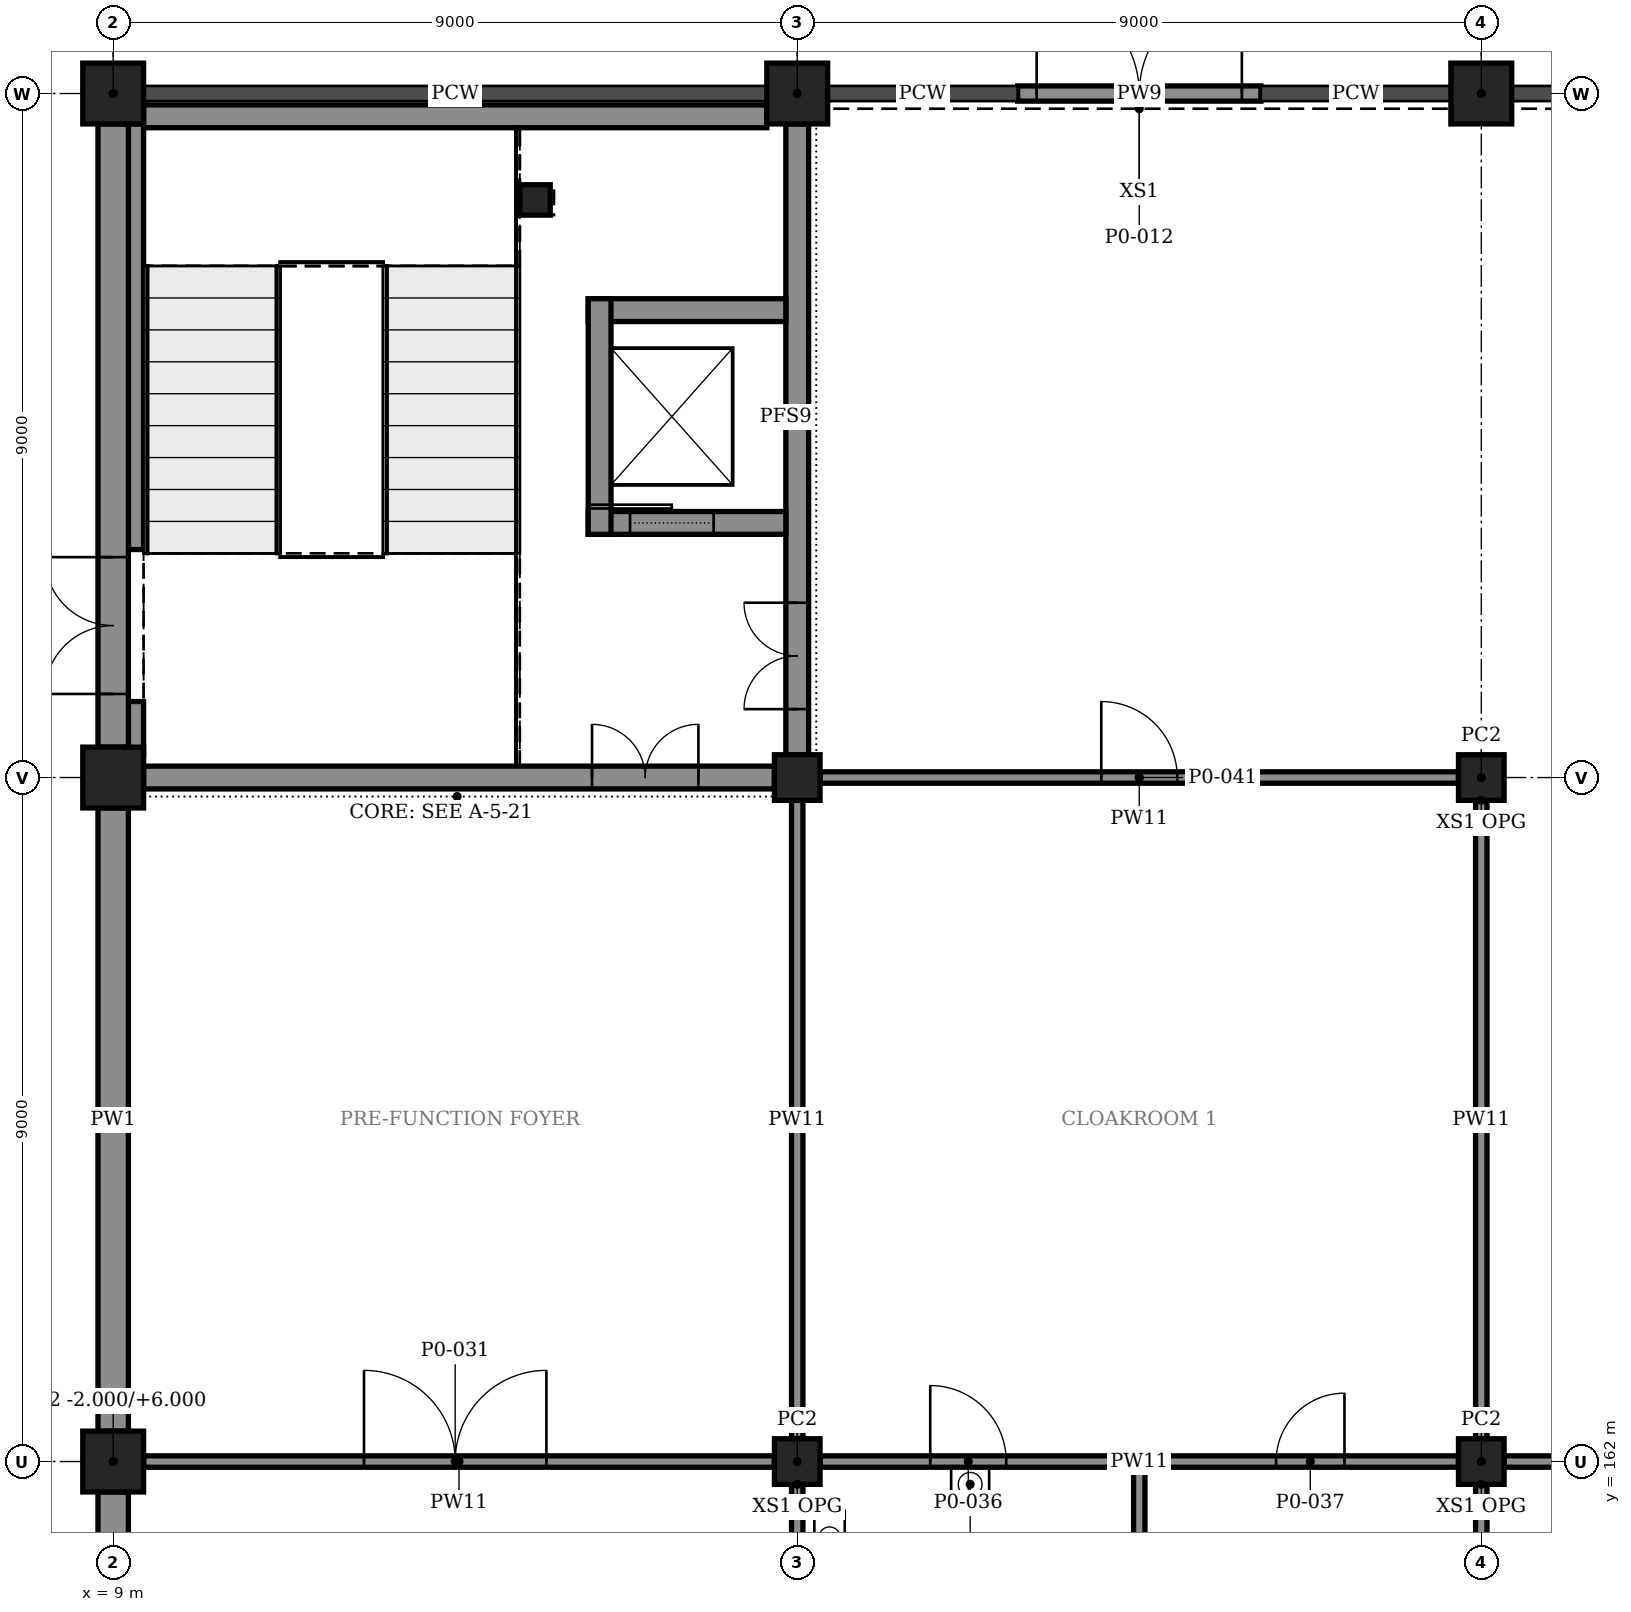
"""IFC4 building model, lengths in metres.
Left out: names, types, materials, properties, quantities, classifications, styles, units other than length and angle.
Written with IfcOpenShell. Run it as: python <this file> out.ifc"""

import sys

from ifc_helpers import new_model, si_unit, direction, frame, frame_2d, origin, origin_2d, place, context, subcontext, project, spatial, rectangle, extrude, element, fill, save


model = new_model("IFC4")
c1 = context("Model", 3, precision=1e-05, world=origin(), true_north=direction((0.0, 1.0)))
c2 = subcontext(c1, "Body", "Model", "MODEL_VIEW")
j1 = project(units=[si_unit("LENGTHUNIT", "METRE"), si_unit("PLANEANGLEUNIT", "RADIAN")], contexts=[c1])
p1 = place(None, origin())
s1 = spatial("IfcSite", under=j1, at=p1, CompositionType="ELEMENT")
p2 = place(p1, origin())
s2 = spatial("IfcBuilding", under=s1, at=p2, CompositionType="ELEMENT")
p3 = place(p2, origin())
s3 = spatial("IfcBuildingStorey", under=s2, at=p3, CompositionType="ELEMENT", Elevation=0.0)
p4 = place(p3, frame((9.0, 162.0, -2.0), z_axis=(0.0, 0.0, 1.0), x_axis=(1.0, 0.0, 0.0)))
e1 = element("IfcColumn", 1, at=p4, inside=s3, PredefinedType="COLUMN", context=c2, shape_type="SweptSolid", body=[
    extrude(rectangle(XDim=0.8, YDim=0.8, at=origin_2d()), origin(), (0.0, 0.0, 1.0), 8.0),
])
for number, where, z_axis, x_axis in (
    (2, (18.0, 162.0, -2.0), (0.0, 0.0, 1.0), (1.0, 0.0, 0.0)),
    (3, (27.0, 162.0, -2.0), (0.0, 0.0, 1.0), (1.0, 0.0, 0.0)),
):
    element("IfcColumn", number, at=place(p3, frame(where, z_axis=z_axis, x_axis=x_axis)), inside=s3, PredefinedType="COLUMN", context=c2, shape_type="SweptSolid", body=[
        extrude(rectangle(XDim=0.6, YDim=0.6, at=origin_2d()), origin(), (0.0, 0.0, 1.0), 8.0),
    ])
p5 = place(p3, frame((9.0, 171.0, -2.0), z_axis=(0.0, 0.0, 1.0), x_axis=(1.0, 0.0, 0.0)))
e4 = element("IfcColumn", 4, at=p5, inside=s3, PredefinedType="COLUMN", context=c2, shape_type="SweptSolid", body=[
    extrude(rectangle(XDim=0.8, YDim=0.8, at=origin_2d()), origin(), (0.0, 0.0, 1.0), 8.0),
])
for number, where, z_axis, x_axis in (
    (5, (18.0, 171.0, -2.0), (0.0, 0.0, 1.0), (1.0, 0.0, 0.0)),
    (6, (27.0, 171.0, -2.0), (0.0, 0.0, 1.0), (1.0, 0.0, 0.0)),
):
    element("IfcColumn", number, at=place(p3, frame(where, z_axis=z_axis, x_axis=x_axis)), inside=s3, PredefinedType="COLUMN", context=c2, shape_type="SweptSolid", body=[
        extrude(rectangle(XDim=0.6, YDim=0.6, at=origin_2d()), origin(), (0.0, 0.0, 1.0), 8.0),
    ])
for number, where, z_axis, x_axis in (
    (7, (9.0, 180.0, -2.0), (0.0, 0.0, 1.0), (1.0, 0.0, 0.0)),
    (8, (18.0, 180.0, -2.0), (0.0, 0.0, 1.0), (1.0, 0.0, 0.0)),
    (9, (27.0, 180.0, -2.0), (0.0, 0.0, 1.0), (1.0, 0.0, 0.0)),
):
    element("IfcColumn", number, at=place(p3, frame(where, z_axis=z_axis, x_axis=x_axis)), inside=s3, PredefinedType="COLUMN", context=c2, shape_type="SweptSolid", body=[
        extrude(rectangle(XDim=0.8, YDim=0.8, at=origin_2d()), origin(), (0.0, 0.0, 1.0), 8.0),
    ])
p6 = place(p3, frame((14.55, 178.6, -0.3), z_axis=(0.0, 0.0, 1.0), x_axis=(1.0, 0.0, 0.0)))
e10 = element("IfcColumn", 10, at=p6, inside=s3, PredefinedType="COLUMN", context=c2, shape_type="SweptSolid", body=[
    extrude(rectangle(XDim=0.4, YDim=0.4, at=origin_2d()), origin(), (0.0, 0.0, 1.0), 6.3),
])
p7 = place(p3, frame((9.0, 153.4, 0.0), z_axis=(0.0, 0.0, 1.0), x_axis=(0.0, 1.0, 0.0)))
e11 = element("IfcWall", 11, at=p7, inside=s3, PredefinedType="SOLIDWALL", context=c2, shape_type="SweptSolid", body=[
    extrude(rectangle(XDim=8.2, YDim=0.4, at=frame_2d((4.1, 0.0))), origin(), (0.0, 0.0, 1.0), 6.0),
])
p8 = place(p7, frame((2.9, 0.0, 0.0)))
e12 = element("IfcOpeningElement", 12, at=p8, cuts=e11, PredefinedType="OPENING", context=c2, shape_type="SweptSolid", body=[
    extrude(rectangle(XDim=2.4, YDim=2.4, at=frame_2d((1.2, 1.2))), frame((0.0, 0.21, 0.0), z_axis=(0.0, -1.0, 0.0), x_axis=(1.0, 0.0, 0.0)), (0.0, 0.0, 1.0), 0.42),
])
p9 = place(p3, frame((9.0, 162.4, 0.0), z_axis=(0.0, 0.0, 1.0), x_axis=(0.0, 1.0, 0.0)))
e13 = element("IfcWall", 13, at=p9, inside=s3, PredefinedType="SOLIDWALL", context=c2, shape_type="SweptSolid", body=[
    extrude(rectangle(XDim=8.2, YDim=0.4, at=frame_2d((4.1, 0.0))), origin(), (0.0, 0.0, 1.0), 6.0),
])
p10 = place(p3, frame((9.0, 171.4, 0.0), z_axis=(0.0, 0.0, 1.0), x_axis=(0.0, 1.0, 0.0)))
e14 = element("IfcWall", 14, at=p10, inside=s3, PredefinedType="SOLIDWALL", context=c2, shape_type="SweptSolid", body=[
    extrude(rectangle(XDim=8.2, YDim=0.4, at=frame_2d((4.1, 0.0))), origin(), (0.0, 0.0, 1.0), 6.0),
])
p11 = place(p10, frame((0.7, 0.0, 0.0)))
e15 = element("IfcOpeningElement", 15, at=p11, cuts=e14, PredefinedType="OPENING", context=c2, shape_type="SweptSolid", body=[
    extrude(rectangle(XDim=1.8, YDim=2.4, at=frame_2d((0.9, 1.2))), frame((0.0, 0.21, 0.0), z_axis=(0.0, -1.0, 0.0), x_axis=(1.0, 0.0, 0.0)), (0.0, 0.0, 1.0), 0.42),
])
p12 = place(p3, frame((20.9, 180.0, 0.0), z_axis=(0.0, 0.0, 1.0), x_axis=(1.0, 0.0, 0.0)))
e16 = element("IfcWall", 16, at=p12, inside=s3, PredefinedType="STANDARD", context=c2, shape_type="SweptSolid", body=[
    extrude(rectangle(XDim=3.2, YDim=0.2, at=frame_2d((1.6, 0.0))), origin(), (0.0, 0.0, 1.0), 4.82),
])
p13 = place(p12, frame((0.25, 0.0, 0.0)))
e17 = element("IfcOpeningElement", 17, at=p13, cuts=e16, PredefinedType="OPENING", context=c2, shape_type="SweptSolid", body=[
    extrude(rectangle(XDim=2.7, YDim=3.0, at=frame_2d((1.35, 1.5))), frame((0.0, 0.11, 0.0), z_axis=(0.0, -1.0, 0.0), x_axis=(1.0, 0.0, 0.0)), (0.0, 0.0, 1.0), 0.22),
])
p14 = place(p3, frame((18.0, 171.3, 0.0), z_axis=(0.0, 0.0, 1.0), x_axis=(0.0, 1.0, 0.0)))
e18 = element("IfcWall", 18, at=p14, inside=s3, PredefinedType="SOLIDWALL", context=c2, shape_type="SweptSolid", body=[
    extrude(rectangle(XDim=8.3, YDim=0.3, at=frame_2d((4.15, 0.0))), origin(), (0.0, 0.0, 1.0), 4.82),
])
p15 = place(p14, frame((0.6, 0.0, 0.0)))
e19 = element("IfcOpeningElement", 19, at=p15, cuts=e18, PredefinedType="OPENING", context=c2, shape_type="SweptSolid", body=[
    extrude(rectangle(XDim=1.4, YDim=2.4, at=frame_2d((0.7, 1.2))), frame((0.0, 0.16, 0.0), z_axis=(0.0, -1.0, 0.0), x_axis=(1.0, 0.0, 0.0)), (0.0, 0.0, 1.0), 0.32),
])
p16 = place(p3, frame((9.4, 171.0, 0.0), z_axis=(0.0, 0.0, 1.0), x_axis=(1.0, 0.0, 0.0)))
e20 = element("IfcWall", 20, at=p16, inside=s3, PredefinedType="SOLIDWALL", context=c2, shape_type="SweptSolid", body=[
    extrude(rectangle(XDim=8.3, YDim=0.3, at=frame_2d((4.15, 0.0))), origin(), (0.0, 0.0, 1.0), 4.82),
])
p17 = place(p16, frame((5.9, 0.0, 0.0)))
e21 = element("IfcOpeningElement", 21, at=p17, cuts=e20, PredefinedType="OPENING", context=c2, shape_type="SweptSolid", body=[
    extrude(rectangle(XDim=1.4, YDim=2.4, at=frame_2d((0.7, 1.2))), frame((0.0, 0.16, 0.0), z_axis=(0.0, -1.0, 0.0), x_axis=(1.0, 0.0, 0.0)), (0.0, 0.0, 1.0), 0.32),
])
p18 = place(p3, frame((9.3, 171.3, 0.0), z_axis=(0.0, 0.0, 1.0), x_axis=(0.0, 1.0, 0.0)))
e22 = element("IfcWall", 22, at=p18, inside=s3, PredefinedType="SOLIDWALL", context=c2, shape_type="SweptSolid", body=[
    extrude(rectangle(XDim=0.7, YDim=0.2, at=frame_2d((0.35, 0.0))), origin(), (0.0, 0.0, 1.0), 5.72),
])
p19 = place(p3, frame((9.3, 174.0, 0.0), z_axis=(0.0, 0.0, 1.0), x_axis=(0.0, 1.0, 0.0)))
e23 = element("IfcWall", 23, at=p19, inside=s3, PredefinedType="SOLIDWALL", context=c2, shape_type="SweptSolid", body=[
    extrude(rectangle(XDim=5.6, YDim=0.2, at=frame_2d((2.8, 0.0))), origin(), (0.0, 0.0, 1.0), 5.72),
])
p20 = place(p3, frame((9.4, 179.7, 0.0), z_axis=(0.0, 0.0, 1.0), x_axis=(1.0, 0.0, 0.0)))
e24 = element("IfcWall", 24, at=p20, inside=s3, PredefinedType="SOLIDWALL", context=c2, shape_type="SweptSolid", body=[
    extrude(rectangle(XDim=8.2, YDim=0.3, at=frame_2d((4.1, 0.0))), origin(), (0.0, 0.0, 1.0), 4.82),
])
p21 = place(p3, frame((9.4, 162.0, 0.0), z_axis=(0.0, 0.0, 1.0), x_axis=(1.0, 0.0, 0.0)))
e25 = element("IfcWall", 25, at=p21, inside=s3, PredefinedType="PARTITIONING", context=c2, shape_type="SweptSolid", body=[
    extrude(rectangle(XDim=8.3, YDim=0.15, at=frame_2d((4.15, 0.0))), origin(), (0.0, 0.0, 1.0), 4.82),
])
p22 = place(p21, frame((2.9, 0.0, 0.0)))
e26 = element("IfcOpeningElement", 26, at=p22, cuts=e25, PredefinedType="OPENING", context=c2, shape_type="SweptSolid", body=[
    extrude(rectangle(XDim=2.4, YDim=2.4, at=frame_2d((1.2, 1.2))), frame((0.0, 0.085, 0.0), z_axis=(0.0, -1.0, 0.0), x_axis=(1.0, 0.0, 0.0)), (0.0, 0.0, 1.0), 0.17),
])
p23 = place(p3, frame((18.3, 162.0, 0.0), z_axis=(0.0, 0.0, 1.0), x_axis=(1.0, 0.0, 0.0)))
e27 = element("IfcWall", 27, at=p23, inside=s3, PredefinedType="PARTITIONING", context=c2, shape_type="SweptSolid", body=[
    extrude(rectangle(XDim=8.4, YDim=0.15, at=frame_2d((4.2, 0.0))), origin(), (0.0, 0.0, 1.0), 4.82),
])
p24 = place(p23, frame((1.45, 0.0, 0.0)))
e28 = element("IfcOpeningElement", 28, at=p24, cuts=e27, PredefinedType="OPENING", context=c2, shape_type="SweptSolid", body=[
    extrude(rectangle(XDim=1.0, YDim=2.4, at=frame_2d((0.5, 1.2))), frame((0.0, 0.085, 0.0), z_axis=(0.0, -1.0, 0.0), x_axis=(1.0, 0.0, 0.0)), (0.0, 0.0, 1.0), 0.17),
])
p25 = place(p23, frame((6.0, 0.0, 0.0)))
e29 = element("IfcOpeningElement", 29, at=p25, cuts=e27, PredefinedType="OPENING", context=c2, shape_type="SweptSolid", body=[
    extrude(rectangle(XDim=0.9, YDim=2.1, at=frame_2d((0.45, 1.05))), frame((0.0, 0.085, 0.0), z_axis=(0.0, -1.0, 0.0), x_axis=(1.0, 0.0, 0.0)), (0.0, 0.0, 1.0), 0.17),
])
p26 = place(p3, frame((27.3, 162.0, 0.0), z_axis=(0.0, 0.0, 1.0), x_axis=(1.0, 0.0, 0.0)))
e30 = element("IfcWall", 30, at=p26, inside=s3, PredefinedType="PARTITIONING", context=c2, shape_type="SweptSolid", body=[
    extrude(rectangle(XDim=8.4, YDim=0.15, at=frame_2d((4.2, 0.0))), origin(), (0.0, 0.0, 1.0), 4.82),
])
p27 = place(p26, frame((3.0, 0.0, 0.0)))
e31 = element("IfcOpeningElement", 31, at=p27, cuts=e30, PredefinedType="OPENING", context=c2, shape_type="SweptSolid", body=[
    extrude(rectangle(XDim=2.4, YDim=2.4, at=frame_2d((1.2, 1.2))), frame((0.0, 0.085, 0.0), z_axis=(0.0, -1.0, 0.0), x_axis=(1.0, 0.0, 0.0)), (0.0, 0.0, 1.0), 0.17),
])
p28 = place(p3, frame((18.0, 153.3, 0.0), z_axis=(0.0, 0.0, 1.0), x_axis=(0.0, 1.0, 0.0)))
e32 = element("IfcWall", 32, at=p28, inside=s3, PredefinedType="PARTITIONING", context=c2, shape_type="SweptSolid", body=[
    extrude(rectangle(XDim=8.4, YDim=0.15, at=frame_2d((4.2, 0.0))), origin(), (0.0, 0.0, 1.0), 4.82),
])
p29 = place(p3, frame((27.0, 153.3, 0.0), z_axis=(0.0, 0.0, 1.0), x_axis=(0.0, 1.0, 0.0)))
e33 = element("IfcWall", 33, at=p29, inside=s3, PredefinedType="PARTITIONING", context=c2, shape_type="SweptSolid", body=[
    extrude(rectangle(XDim=8.4, YDim=0.15, at=frame_2d((4.2, 0.0))), origin(), (0.0, 0.0, 1.0), 4.82),
])
p30 = place(p29, frame((2.2, 0.0, 0.0)))
e34 = element("IfcOpeningElement", 34, at=p30, cuts=e33, PredefinedType="OPENING", context=c2, shape_type="SweptSolid", body=[
    extrude(rectangle(XDim=1.0, YDim=2.4, at=frame_2d((0.5, 1.2))), frame((0.0, 0.085, 0.0), z_axis=(0.0, -1.0, 0.0), x_axis=(1.0, 0.0, 0.0)), (0.0, 0.0, 1.0), 0.17),
])
p31 = place(p3, frame((22.5, 159.075, 0.0), z_axis=(0.0, 0.0, 1.0), x_axis=(0.0, 1.0, 0.0)))
e35 = element("IfcWall", 35, at=p31, inside=s3, PredefinedType="PARTITIONING", context=c2, shape_type="SweptSolid", body=[
    extrude(rectangle(XDim=2.85, YDim=0.15, at=frame_2d((1.425, 0.0))), origin(), (0.0, 0.0, 1.0), 5.72),
])
for number, where, z_axis, x_axis in (
    (36, (18.0, 162.3, 0.0), (0.0, 0.0, 1.0), (0.0, 1.0, 0.0)),
    (37, (27.0, 162.3, 0.0), (0.0, 0.0, 1.0), (0.0, 1.0, 0.0)),
):
    element("IfcWall", number, at=place(p3, frame(where, z_axis=z_axis, x_axis=x_axis)), inside=s3, PredefinedType="PARTITIONING", context=c2, shape_type="SweptSolid", body=[
        extrude(rectangle(XDim=8.4, YDim=0.15, at=frame_2d((4.2, 0.0))), origin(), (0.0, 0.0, 1.0), 4.82),
    ])
p32 = place(p3, frame((18.3, 171.0, 0.0), z_axis=(0.0, 0.0, 1.0), x_axis=(1.0, 0.0, 0.0)))
e38 = element("IfcWall", 38, at=p32, inside=s3, PredefinedType="PARTITIONING", context=c2, shape_type="SweptSolid", body=[
    extrude(rectangle(XDim=8.4, YDim=0.15, at=frame_2d((4.2, 0.0))), origin(), (0.0, 0.0, 1.0), 4.82),
])
p33 = place(p32, frame((3.7, 0.0, 0.0)))
e39 = element("IfcOpeningElement", 39, at=p33, cuts=e38, PredefinedType="OPENING", context=c2, shape_type="SweptSolid", body=[
    extrude(rectangle(XDim=1.0, YDim=2.4, at=frame_2d((0.5, 1.2))), frame((0.0, 0.085, 0.0), z_axis=(0.0, -1.0, 0.0), x_axis=(1.0, 0.0, 0.0)), (0.0, 0.0, 1.0), 0.17),
])
p34 = place(p3, frame((15.4, 174.2, -1.2), z_axis=(0.0, 0.0, 1.0), x_axis=(0.0, 1.0, 0.0)))
e40 = element("IfcWall", 40, at=p34, inside=s3, PredefinedType="SOLIDWALL", context=c2, shape_type="SweptSolid", body=[
    extrude(rectangle(XDim=3.1, YDim=0.3, at=frame_2d((1.55, 0.0))), origin(), (0.0, 0.0, 1.0), 6.92),
])
p35 = place(p3, frame((15.25, 174.35, -1.2), z_axis=(0.0, 0.0, 1.0), x_axis=(1.0, 0.0, 0.0)))
e41 = element("IfcWall", 41, at=p35, inside=s3, PredefinedType="SOLIDWALL", context=c2, shape_type="SweptSolid", body=[
    extrude(rectangle(XDim=2.6, YDim=0.3, at=frame_2d((1.3, 0.0))), origin(), (0.0, 0.0, 1.0), 6.92),
])
p36 = place(p35, frame((0.55, 0.0, 1.2)))
e42 = element("IfcOpeningElement", 42, at=p36, cuts=e41, PredefinedType="OPENING", context=c2, shape_type="SweptSolid", body=[
    extrude(rectangle(XDim=1.1, YDim=2.1, at=frame_2d((0.55, 1.05))), frame((0.0, 0.16, 0.0), z_axis=(0.0, -1.0, 0.0), x_axis=(1.0, 0.0, 0.0)), (0.0, 0.0, 1.0), 0.32),
])
p37 = place(p3, frame((15.25, 177.15, -1.2), z_axis=(0.0, 0.0, 1.0), x_axis=(1.0, 0.0, 0.0)))
e43 = element("IfcWall", 43, at=p37, inside=s3, PredefinedType="SOLIDWALL", context=c2, shape_type="SweptSolid", body=[
    extrude(rectangle(XDim=2.6, YDim=0.3, at=frame_2d((1.3, 0.0))), origin(), (0.0, 0.0, 1.0), 6.92),
])
p38 = place(p11, origin())
e44 = element("IfcDoor", 44, at=p38, inside=s3, OperationType="DOUBLE_DOOR_SINGLE_SWING", PredefinedType="DOOR", context=c2, shape_type="SweptSolid", body=[
    extrude(rectangle(XDim=1.8, YDim=2.4, at=frame_2d((0.9, 1.2))), frame((0.0, 0.025, 0.0), z_axis=(0.0, -1.0, 0.0), x_axis=(1.0, 0.0, 0.0)), (0.0, 0.0, 1.0), 0.05),
])
fill(e15, e44)
p39 = place(p13, origin())
e45 = element("IfcDoor", 45, at=p39, inside=s3, OperationType="DOUBLE_DOOR_SINGLE_SWING", PredefinedType="DOOR", context=c2, shape_type="SweptSolid", body=[
    extrude(rectangle(XDim=2.7, YDim=3.0, at=frame_2d((1.35, 1.5))), frame((0.0, 0.025, 0.0), z_axis=(0.0, -1.0, 0.0), x_axis=(1.0, 0.0, 0.0)), (0.0, 0.0, 1.0), 0.05),
])
fill(e17, e45)
p40 = place(p17, origin())
e46 = element("IfcDoor", 46, at=p40, inside=s3, OperationType="SINGLE_SWING_LEFT", PredefinedType="DOOR", context=c2, shape_type="SweptSolid", body=[
    extrude(rectangle(XDim=1.4, YDim=2.4, at=frame_2d((0.7, 1.2))), frame((0.0, 0.025, 0.0), z_axis=(0.0, -1.0, 0.0), x_axis=(1.0, 0.0, 0.0)), (0.0, 0.0, 1.0), 0.05),
])
fill(e21, e46)
p41 = place(p15, origin())
e47 = element("IfcDoor", 47, at=p41, inside=s3, OperationType="SINGLE_SWING_LEFT", PredefinedType="DOOR", context=c2, shape_type="SweptSolid", body=[
    extrude(rectangle(XDim=1.4, YDim=2.4, at=frame_2d((0.7, 1.2))), frame((0.0, 0.025, 0.0), z_axis=(0.0, -1.0, 0.0), x_axis=(1.0, 0.0, 0.0)), (0.0, 0.0, 1.0), 0.05),
])
fill(e19, e47)
p42 = place(p22, origin())
e48 = element("IfcDoor", 48, at=p42, inside=s3, OperationType="SINGLE_SWING_LEFT", PredefinedType="DOOR", context=c2, shape_type="SweptSolid", body=[
    extrude(rectangle(XDim=2.4, YDim=2.4, at=frame_2d((1.2, 1.2))), frame((0.0, 0.025, 0.0), z_axis=(0.0, -1.0, 0.0), x_axis=(1.0, 0.0, 0.0)), (0.0, 0.0, 1.0), 0.05),
])
fill(e26, e48)
p43 = place(p24, origin())
e49 = element("IfcDoor", 49, at=p43, inside=s3, OperationType="SINGLE_SWING_LEFT", PredefinedType="DOOR", context=c2, shape_type="SweptSolid", body=[
    extrude(rectangle(XDim=1.0, YDim=2.4, at=frame_2d((0.5, 1.2))), frame((0.0, 0.025, 0.0), z_axis=(0.0, -1.0, 0.0), x_axis=(1.0, 0.0, 0.0)), (0.0, 0.0, 1.0), 0.05),
])
fill(e28, e49)
p44 = place(p25, origin())
e50 = element("IfcDoor", 50, at=p44, inside=s3, OperationType="SINGLE_SWING_RIGHT", PredefinedType="DOOR", context=c2, shape_type="SweptSolid", body=[
    extrude(rectangle(XDim=0.9, YDim=2.1, at=frame_2d((0.45, 1.05))), frame((0.0, 0.025, 0.0), z_axis=(0.0, -1.0, 0.0), x_axis=(1.0, 0.0, 0.0)), (0.0, 0.0, 1.0), 0.05),
])
fill(e29, e50)
p45 = place(p33, origin())
e51 = element("IfcDoor", 51, at=p45, inside=s3, OperationType="SINGLE_SWING_LEFT", PredefinedType="DOOR", context=c2, shape_type="SweptSolid", body=[
    extrude(rectangle(XDim=1.0, YDim=2.4, at=frame_2d((0.5, 1.2))), frame((0.0, 0.025, 0.0), z_axis=(0.0, -1.0, 0.0), x_axis=(1.0, 0.0, 0.0)), (0.0, 0.0, 1.0), 0.05),
])
fill(e39, e51)
p46 = place(p36, origin())
e52 = element("IfcDoor", 52, at=p46, inside=s3, OperationType="SLIDING_TO_LEFT", PredefinedType="DOOR", context=c2, shape_type="SweptSolid", body=[
    extrude(rectangle(XDim=1.1, YDim=2.1, at=frame_2d((0.55, 1.05))), frame((0.0, 0.025, 0.0), z_axis=(0.0, -1.0, 0.0), x_axis=(1.0, 0.0, 0.0)), (0.0, 0.0, 1.0), 0.05),
])
fill(e42, e52)
save(model, sys.argv[1])
